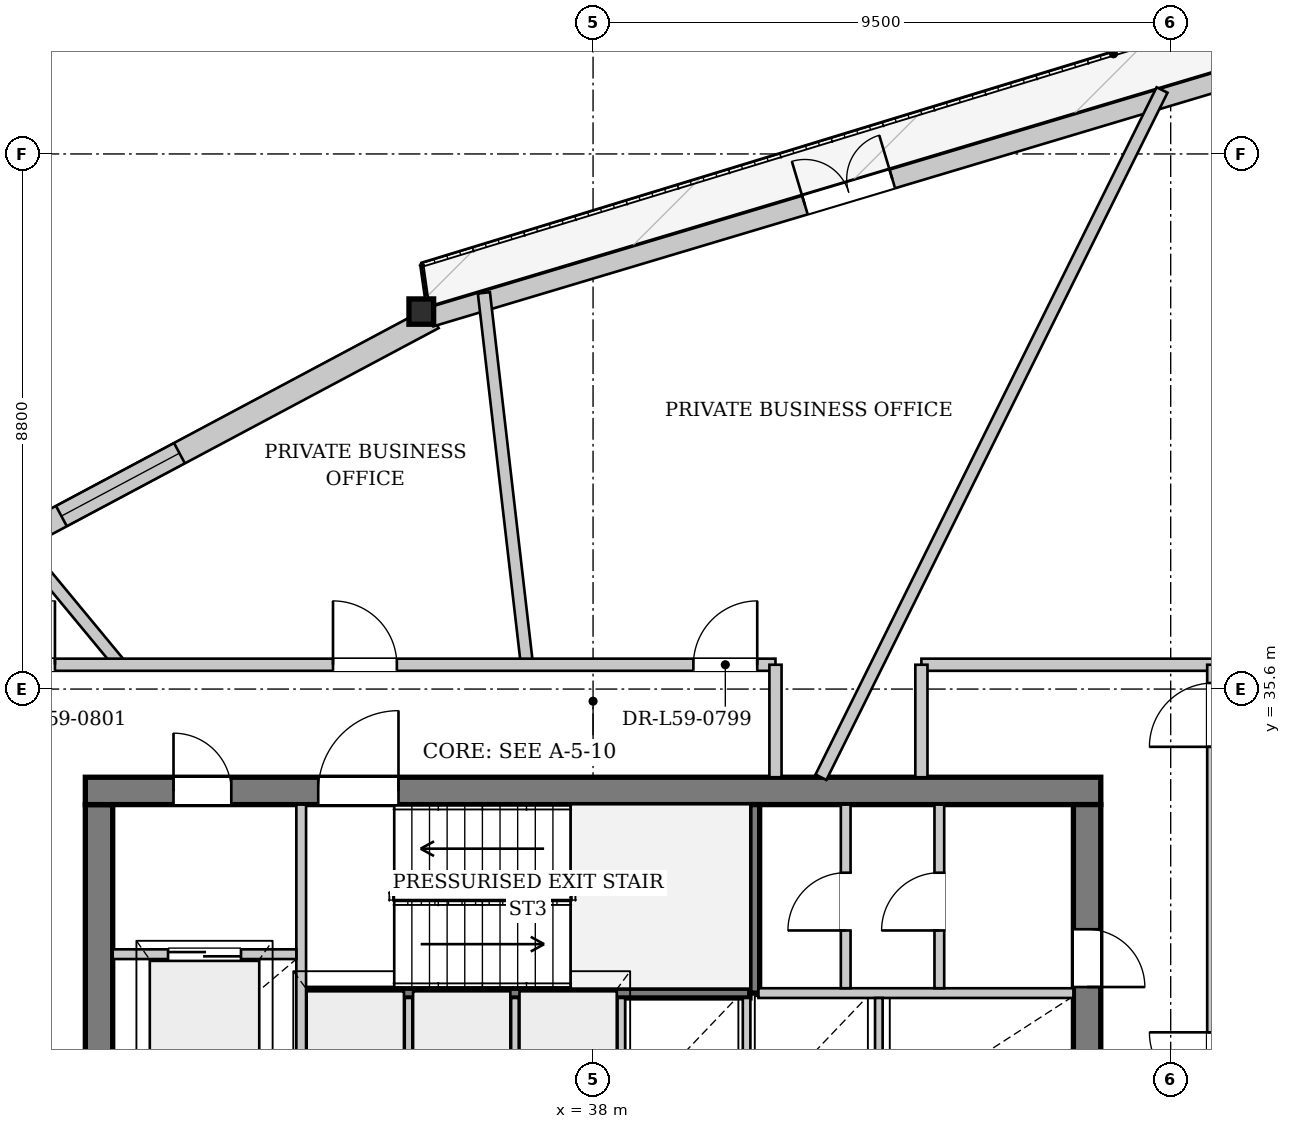
"""IFC4 building model, lengths in metres.
Left out: names, types, materials, properties, quantities, classifications, styles, units other than length and angle.
Written with IfcOpenShell. Run it as: python <this file> out.ifc"""

import sys

from ifc_helpers import new_model, si_unit, direction, frame, frame_2d, origin, origin_2d, place, context, subcontext, project, spatial, rectangle, i_section, extrude, source, transform, mapped, element, fill, save


model = new_model("IFC4")
c1 = context("Model", 3, precision=1e-05, world=origin(), true_north=direction((0.0, 1.0)))
c2 = subcontext(c1, "Body", "Model", "MODEL_VIEW")
j1 = project(units=[si_unit("LENGTHUNIT", "METRE"), si_unit("PLANEANGLEUNIT", "RADIAN")], contexts=[c1])
p1 = place(None, origin())
s1 = spatial("IfcSite", under=j1, at=p1, CompositionType="ELEMENT")
p2 = place(p1, origin())
s2 = spatial("IfcBuilding", under=s1, at=p2, CompositionType="ELEMENT")
p3 = place(p2, frame((0.0, 0.0, 223.8)))
s3 = spatial("IfcBuildingStorey", under=s2, at=p3, CompositionType="ELEMENT", Elevation=223.8)
m1 = source(origin(), c2, "Body", "SweptSolid", [
    extrude(i_section(OverallWidth=0.406, OverallDepth=0.416, WebThickness=0.027, FlangeThickness=0.042, at=origin_2d()), origin(), (0.0, 0.0, 1.0), 3.394),
])
p4 = place(p3, frame((35.282, 41.871, 0.0), z_axis=(-0.063010651639, -0.037475513132, 0.99730900111), x_axis=(0.511173344598, -0.859477638902, 0.0)))
e1 = element("IfcColumn", 1, at=p4, inside=s3, PredefinedType="COLUMN", context=c2, shape_type="MappedRepresentation", body=[
    mapped(m1, transform((0.0, 0.0, 0.0), x_axis=(1.0, 0.0, 0.0), y_axis=(0.0, 1.0, 0.0), z_axis=(0.0, 0.0, 1.0), scale=1.0)),
])
p5 = place(p3, frame((15.581, 31.156, 0.0), z_axis=(0.0, 0.0, 1.0), x_axis=(0.882484000586, 0.470342416448, 0.0)))
e2 = element("IfcWall", 2, at=p5, inside=s3, PredefinedType="SOLIDWALL", context=c2, shape_type="SweptSolid", body=[
    extrude(rectangle(XDim=22.425, YDim=0.38, at=frame_2d((11.213, 0.0))), origin(), (0.0, 0.0, 1.0), 2.822),
])
p6 = place(p5, frame((5.179, 0.0, 0.452)))
e3 = element("IfcOpeningElement", 3, at=p6, cuts=e2, PredefinedType="OPENING", context=c2, shape_type="SweptSolid", body=[
    extrude(rectangle(XDim=2.2, YDim=2.25, at=frame_2d((1.1, 1.125))), frame((0.0, 0.2, 0.0), z_axis=(0.0, -1.0, 0.0), x_axis=(1.0, 0.0, 0.0)), (0.0, 0.0, 1.0), 0.4),
])
p7 = place(p5, frame((15.496, 0.0, 0.452)))
e4 = element("IfcOpeningElement", 4, at=p7, cuts=e2, PredefinedType="OPENING", context=c2, shape_type="SweptSolid", body=[
    extrude(rectangle(XDim=2.2, YDim=2.25, at=frame_2d((1.1, 1.125))), frame((0.0, 0.2, 0.0), z_axis=(0.0, -1.0, 0.0), x_axis=(1.0, 0.0, 0.0)), (0.0, 0.0, 1.0), 0.4),
])
p8 = place(p3, frame((35.328, 41.718, 0.0), z_axis=(0.0, 0.0, 1.0), x_axis=(0.958068349803, 0.286539765313, 0.0)))
e5 = element("IfcWall", 5, at=p8, inside=s3, PredefinedType="SOLIDWALL", context=c2, shape_type="SweptSolid", body=[
    extrude(rectangle(XDim=22.426, YDim=0.32, at=frame_2d((11.213, 0.0))), origin(), (0.0, 0.0, 1.0), 2.822),
])
p9 = place(p8, frame((6.426, 0.0, 0.0)))
e6 = element("IfcOpeningElement", 6, at=p9, cuts=e5, PredefinedType="OPENING", context=c2, shape_type="SweptSolid", body=[
    extrude(rectangle(XDim=1.5, YDim=2.3, at=frame_2d((0.75, 1.15))), frame((0.0, 0.17, 0.0), z_axis=(0.0, -1.0, 0.0), x_axis=(1.0, 0.0, 0.0)), (0.0, 0.0, 1.0), 0.34),
])
p10 = place(p8, frame((15.295, 0.0, 0.352)))
e7 = element("IfcOpeningElement", 7, at=p10, cuts=e5, PredefinedType="OPENING", context=c2, shape_type="SweptSolid", body=[
    extrude(rectangle(XDim=2.6, YDim=2.35, at=frame_2d((1.3, 1.175))), frame((0.0, 0.17, 0.0), z_axis=(0.0, -1.0, 0.0), x_axis=(1.0, 0.0, 0.0)), (0.0, 0.0, 1.0), 0.34),
])
p11 = place(p3, frame((29.875, 19.5, 0.0), z_axis=(0.0, 0.0, 1.0), x_axis=(0.0, 1.0, 0.0)))
e8 = element("IfcWall", 8, at=p11, inside=s3, PredefinedType="SHEAR", context=c2, shape_type="SweptSolid", body=[
    extrude(rectangle(XDim=14.2, YDim=0.45, at=frame_2d((7.1, 0.0))), origin(), (0.0, 0.0, 1.0), 3.33),
])
p12 = place(p11, frame((7.42, 0.0, 0.0)))
e9 = element("IfcOpeningElement", 9, at=p12, cuts=e8, PredefinedType="OPENING", context=c2, shape_type="SweptSolid", body=[
    extrude(rectangle(XDim=1.6, YDim=2.2, at=frame_2d((0.8, 1.1))), frame((0.0, 0.235, 0.0), z_axis=(0.0, -1.0, 0.0), x_axis=(1.0, 0.0, 0.0)), (0.0, 0.0, 1.0), 0.47),
])
p13 = place(p3, frame((29.65, 33.925, 0.0), z_axis=(0.0, 0.0, 1.0), x_axis=(1.0, 0.0, 0.0)))
e10 = element("IfcWall", 10, at=p13, inside=s3, PredefinedType="SHEAR", context=c2, shape_type="SweptSolid", body=[
    extrude(rectangle(XDim=16.7, YDim=0.45, at=frame_2d((8.35, 0.0))), origin(), (0.0, 0.0, 1.0), 3.33),
])
p14 = place(p13, frame((1.45, 0.0, 0.0)))
e11 = element("IfcOpeningElement", 11, at=p14, cuts=e10, PredefinedType="OPENING", context=c2, shape_type="SweptSolid", body=[
    extrude(rectangle(XDim=0.95, YDim=2.1, at=frame_2d((0.475, 1.05))), frame((0.0, 0.235, 0.0), z_axis=(0.0, -1.0, 0.0), x_axis=(1.0, 0.0, 0.0)), (0.0, 0.0, 1.0), 0.47),
])
p15 = place(p13, frame((3.83, 0.0, 0.0)))
e12 = element("IfcOpeningElement", 12, at=p15, cuts=e10, PredefinedType="OPENING", context=c2, shape_type="SweptSolid", body=[
    extrude(rectangle(XDim=1.32, YDim=2.2, at=frame_2d((0.66, 1.1))), frame((0.0, 0.235, 0.0), z_axis=(0.0, -1.0, 0.0), x_axis=(1.0, 0.0, 0.0)), (0.0, 0.0, 1.0), 0.47),
])
p16 = place(p3, frame((46.125, 33.7, 0.0), z_axis=(0.0, 0.0, 1.0), x_axis=(0.0, -1.0, 0.0)))
e13 = element("IfcWall", 13, at=p16, inside=s3, PredefinedType="SHEAR", context=c2, shape_type="SweptSolid", body=[
    extrude(rectangle(XDim=14.2, YDim=0.45, at=frame_2d((7.1, 0.0))), origin(), (0.0, 0.0, 1.0), 3.33),
])
p17 = place(p16, frame((5.18, 0.0, 0.0)))
e14 = element("IfcOpeningElement", 14, at=p17, cuts=e13, PredefinedType="OPENING", context=c2, shape_type="SweptSolid", body=[
    extrude(rectangle(XDim=1.6, YDim=2.2, at=frame_2d((0.8, 1.1))), frame((0.0, 0.235, 0.0), z_axis=(0.0, -1.0, 0.0), x_axis=(1.0, 0.0, 0.0)), (0.0, 0.0, 1.0), 0.47),
])
p18 = place(p16, frame((2.05, 0.0, 0.0)))
e15 = element("IfcOpeningElement", 15, at=p18, cuts=e13, PredefinedType="OPENING", context=c2, shape_type="SweptSolid", body=[
    extrude(rectangle(XDim=0.95, YDim=2.1, at=frame_2d((0.475, 1.05))), frame((0.0, 0.235, 0.0), z_axis=(0.0, -1.0, 0.0), x_axis=(1.0, 0.0, 0.0)), (0.0, 0.0, 1.0), 0.47),
])
p19 = place(p3, frame((33.28, 30.6, 0.0), z_axis=(0.0, 0.0, 1.0), x_axis=(1.0, 0.0, 0.0)))
e16 = element("IfcWall", 16, at=p19, inside=s3, PredefinedType="PARTITIONING", context=c2, shape_type="SweptSolid", body=[
    extrude(rectangle(XDim=7.3, YDim=0.16, at=frame_2d((3.65, 0.0))), origin(), (0.0, 0.0, 1.0), 3.33),
])
p20 = place(p3, frame((40.66, 30.6, 0.0), z_axis=(0.0, 0.0, 1.0), x_axis=(0.0, 1.0, 0.0)))
e17 = element("IfcWall", 17, at=p20, inside=s3, PredefinedType="PARTITIONING", context=c2, shape_type="SweptSolid", body=[
    extrude(rectangle(XDim=3.1, YDim=0.16, at=frame_2d((1.55, 0.0))), origin(), (0.0, 0.0, 1.0), 3.33),
])
p21 = place(p3, frame((33.2, 28.44, 0.0), z_axis=(0.0, 0.0, 1.0), x_axis=(0.0, 1.0, 0.0)))
e18 = element("IfcWall", 18, at=p21, inside=s3, PredefinedType="PARTITIONING", context=c2, shape_type="SweptSolid", body=[
    extrude(rectangle(XDim=5.26, YDim=0.16, at=frame_2d((2.63, 0.0))), origin(), (0.0, 0.0, 1.0), 3.33),
])
p22 = place(p3, frame((30.1, 31.24, 0.0), z_axis=(0.0, 0.0, 1.0), x_axis=(1.0, 0.0, 0.0)))
e19 = element("IfcWall", 19, at=p22, inside=s3, PredefinedType="PARTITIONING", context=c2, shape_type="SweptSolid", body=[
    extrude(rectangle(XDim=3.02, YDim=0.16, at=frame_2d((1.51, 0.0))), origin(), (0.0, 0.0, 1.0), 3.33),
])
p23 = place(p22, frame((0.91, 0.0, 0.0)))
e20 = element("IfcOpeningElement", 20, at=p23, cuts=e19, PredefinedType="OPENING", context=c2, shape_type="SweptSolid", body=[
    extrude(rectangle(XDim=1.2, YDim=2.2, at=frame_2d((0.6, 1.1))), frame((0.0, 0.09, 0.0), z_axis=(0.0, -1.0, 0.0), x_axis=(1.0, 0.0, 0.0)), (0.0, 0.0, 1.0), 0.18),
])
p24 = place(p3, frame((40.72, 30.6, 0.0), z_axis=(0.0, 0.0, 1.0), x_axis=(1.0, 0.0, 0.0)))
e21 = element("IfcWall", 21, at=p24, inside=s3, PredefinedType="PARTITIONING", context=c2, shape_type="SweptSolid", body=[
    extrude(rectangle(XDim=5.18, YDim=0.16, at=frame_2d((2.59, 0.0))), origin(), (0.0, 0.0, 1.0), 3.33),
])
for number, where, z_axis, x_axis in (
    (22, (34.965, 28.6, 0.0), (0.0, 0.0, 1.0), (0.0, 1.0, 0.0)),
    (23, (36.715, 28.6, 0.0), (0.0, 0.0, 1.0), (0.0, 1.0, 0.0)),
    (24, (38.465, 28.6, 0.0), (0.0, 0.0, 1.0), (0.0, 1.0, 0.0)),
    (25, (40.525, 28.6, 0.0), (0.0, 0.0, 1.0), (0.0, 1.0, 0.0)),
    (26, (42.7, 28.6, 0.0), (0.0, 0.0, 1.0), (0.0, 1.0, 0.0)),
):
    element("IfcWall", number, at=place(p3, frame(where, z_axis=z_axis, x_axis=x_axis)), inside=s3, PredefinedType="PARTITIONING", context=c2, shape_type="SweptSolid", body=[
        extrude(rectangle(XDim=1.92, YDim=0.125, at=frame_2d((0.96, 0.0))), origin(), (0.0, 0.0, 1.0), 3.33),
    ])
p25 = place(p3, frame((42.155, 30.68, 0.0), z_axis=(0.0, 0.0, 1.0), x_axis=(0.0, 1.0, 0.0)))
e27 = element("IfcWall", 27, at=p25, inside=s3, PredefinedType="PARTITIONING", context=c2, shape_type="SweptSolid", body=[
    extrude(rectangle(XDim=3.02, YDim=0.16, at=frame_2d((1.51, 0.0))), origin(), (0.0, 0.0, 1.0), 3.33),
])
p26 = place(p25, frame((0.95, 0.0, 0.0)))
e28 = element("IfcOpeningElement", 28, at=p26, cuts=e27, PredefinedType="OPENING", context=c2, shape_type="SweptSolid", body=[
    extrude(rectangle(XDim=0.95, YDim=2.1, at=frame_2d((0.475, 1.05))), frame((0.0, 0.09, 0.0), z_axis=(0.0, -1.0, 0.0), x_axis=(1.0, 0.0, 0.0)), (0.0, 0.0, 1.0), 0.18),
])
p27 = place(p3, frame((43.695, 30.68, 0.0), z_axis=(0.0, 0.0, 1.0), x_axis=(0.0, 1.0, 0.0)))
e29 = element("IfcWall", 29, at=p27, inside=s3, PredefinedType="PARTITIONING", context=c2, shape_type="SweptSolid", body=[
    extrude(rectangle(XDim=3.02, YDim=0.16, at=frame_2d((1.51, 0.0))), origin(), (0.0, 0.0, 1.0), 3.33),
])
p28 = place(p27, frame((0.95, 0.0, 0.0)))
e30 = element("IfcOpeningElement", 30, at=p28, cuts=e29, PredefinedType="OPENING", context=c2, shape_type="SweptSolid", body=[
    extrude(rectangle(XDim=0.95, YDim=2.1, at=frame_2d((0.475, 1.05))), frame((0.0, 0.09, 0.0), z_axis=(0.0, -1.0, 0.0), x_axis=(1.0, 0.0, 0.0)), (0.0, 0.0, 1.0), 0.18),
])
p29 = place(p3, frame((48.2, 32.632, 0.0), z_axis=(0.0, 0.0, 1.0), x_axis=(0.860740290166, 0.509044352571, 0.0)))
e31 = element("IfcWall", 31, at=p29, inside=s3, PredefinedType="PARTITIONING", context=c2, shape_type="SweptSolid", body=[
    extrude(rectangle(XDim=9.555, YDim=0.2, at=frame_2d((4.777, 0.0))), origin(), (0.0, 0.0, 1.0), 3.33),
])
p30 = place(p3, frame((41.748, 34.15, 0.0), z_axis=(0.0, 0.0, 1.0), x_axis=(0.44463448422, 0.895712105222, 0.0)))
e32 = element("IfcWall", 32, at=p30, inside=s3, PredefinedType="PARTITIONING", context=c2, shape_type="SweptSolid", body=[
    extrude(rectangle(XDim=12.618, YDim=0.2, at=frame_2d((6.309, 0.0))), origin(), (0.0, 0.0, 1.0), 3.33),
])
p31 = place(p3, frame((36.912, 36.0, 0.0), z_axis=(0.0, 0.0, 1.0), x_axis=(-0.114952203338, 0.993371023811, 0.0)))
e33 = element("IfcWall", 33, at=p31, inside=s3, PredefinedType="PARTITIONING", context=c2, shape_type="SweptSolid", body=[
    extrude(rectangle(XDim=6.157, YDim=0.2, at=frame_2d((3.079, 0.0))), origin(), (0.0, 0.0, 1.0), 3.33),
])
p32 = place(p3, frame((30.224, 36.0, 0.0), z_axis=(0.0, 0.0, 1.0), x_axis=(-0.637396404574, 0.770536062386, 0.0)))
e34 = element("IfcWall", 34, at=p32, inside=s3, PredefinedType="PARTITIONING", context=c2, shape_type="SweptSolid", body=[
    extrude(rectangle(XDim=2.829, YDim=0.2, at=frame_2d((1.415, 0.0))), origin(), (0.0, 0.0, 1.0), 3.33),
])
p33 = place(p3, frame((27.8, 36.0, 0.0), z_axis=(0.0, 0.0, 1.0), x_axis=(1.0, 0.0, 0.0)))
e35 = element("IfcWall", 35, at=p33, inside=s3, PredefinedType="PARTITIONING", context=c2, shape_type="SweptSolid", body=[
    extrude(rectangle(XDim=13.2, YDim=0.2, at=frame_2d((6.6, 0.0))), origin(), (0.0, 0.0, 1.0), 3.33),
])
p34 = place(p33, frame((11.85, 0.0, 0.0)))
e36 = element("IfcOpeningElement", 36, at=p34, cuts=e35, PredefinedType="OPENING", context=c2, shape_type="SweptSolid", body=[
    extrude(rectangle(XDim=1.05, YDim=2.2, at=frame_2d((0.525, 1.1))), frame((0.0, 0.11, 0.0), z_axis=(0.0, -1.0, 0.0), x_axis=(1.0, 0.0, 0.0)), (0.0, 0.0, 1.0), 0.22),
])
p35 = place(p33, frame((5.923, 0.0, 0.0)))
e37 = element("IfcOpeningElement", 37, at=p35, cuts=e35, PredefinedType="OPENING", context=c2, shape_type="SweptSolid", body=[
    extrude(rectangle(XDim=1.05, YDim=2.2, at=frame_2d((0.525, 1.1))), frame((0.0, 0.11, 0.0), z_axis=(0.0, -1.0, 0.0), x_axis=(1.0, 0.0, 0.0)), (0.0, 0.0, 1.0), 0.22),
])
p36 = place(p33, frame((0.3, 0.0, 0.0)))
e38 = element("IfcOpeningElement", 38, at=p36, cuts=e35, PredefinedType="OPENING", context=c2, shape_type="SweptSolid", body=[
    extrude(rectangle(XDim=1.05, YDim=2.2, at=frame_2d((0.525, 1.1))), frame((0.0, 0.11, 0.0), z_axis=(0.0, -1.0, 0.0), x_axis=(1.0, 0.0, 0.0)), (0.0, 0.0, 1.0), 0.22),
])
p37 = place(p3, frame((41.0, 34.15, 0.0), z_axis=(0.0, 0.0, 1.0), x_axis=(0.0, 1.0, 0.0)))
e39 = element("IfcWall", 39, at=p37, inside=s3, PredefinedType="PARTITIONING", context=c2, shape_type="SweptSolid", body=[
    extrude(rectangle(XDim=1.85, YDim=0.2, at=frame_2d((0.925, 0.0))), origin(), (0.0, 0.0, 1.0), 3.33),
])
p38 = place(p3, frame((43.4, 36.0, 0.0), z_axis=(0.0, 0.0, 1.0), x_axis=(1.0, 0.0, 0.0)))
e40 = element("IfcWall", 40, at=p38, inside=s3, PredefinedType="PARTITIONING", context=c2, shape_type="SweptSolid", body=[
    extrude(rectangle(XDim=4.8, YDim=0.2, at=frame_2d((2.4, 0.0))), origin(), (0.0, 0.0, 1.0), 3.33),
])
p39 = place(p3, frame((43.4, 34.15, 0.0), z_axis=(0.0, 0.0, 1.0), x_axis=(0.0, 1.0, 0.0)))
e41 = element("IfcWall", 41, at=p39, inside=s3, PredefinedType="PARTITIONING", context=c2, shape_type="SweptSolid", body=[
    extrude(rectangle(XDim=1.85, YDim=0.2, at=frame_2d((0.925, 0.0))), origin(), (0.0, 0.0, 1.0), 3.33),
])
p40 = place(p3, frame((48.2, 17.2, 0.0), z_axis=(0.0, 0.0, 1.0), x_axis=(0.0, 1.0, 0.0)))
e42 = element("IfcWall", 42, at=p40, inside=s3, PredefinedType="PARTITIONING", context=c2, shape_type="SweptSolid", body=[
    extrude(rectangle(XDim=18.8, YDim=0.2, at=frame_2d((9.4, 0.0))), origin(), (0.0, 0.0, 1.0), 3.015),
])
p41 = place(p40, frame((11.705, 0.0, 0.0)))
e43 = element("IfcOpeningElement", 43, at=p41, cuts=e42, PredefinedType="OPENING", context=c2, shape_type="SweptSolid", body=[
    extrude(rectangle(XDim=1.05, YDim=2.2, at=frame_2d((0.525, 1.1))), frame((0.0, 0.11, 0.0), z_axis=(0.0, -1.0, 0.0), x_axis=(1.0, 0.0, 0.0)), (0.0, 0.0, 1.0), 0.22),
])
p42 = place(p40, frame((17.45, 0.0, 0.0)))
e44 = element("IfcOpeningElement", 44, at=p42, cuts=e42, PredefinedType="OPENING", context=c2, shape_type="SweptSolid", body=[
    extrude(rectangle(XDim=1.05, YDim=2.2, at=frame_2d((0.525, 1.1))), frame((0.0, 0.11, 0.0), z_axis=(0.0, -1.0, 0.0), x_axis=(1.0, 0.0, 0.0)), (0.0, 0.0, 1.0), 0.22),
])
p43 = place(p40, frame((0.3, 0.0, 0.0)))
e45 = element("IfcOpeningElement", 45, at=p43, cuts=e42, PredefinedType="OPENING", context=c2, shape_type="SweptSolid", body=[
    extrude(rectangle(XDim=1.05, YDim=2.2, at=frame_2d((0.525, 1.1))), frame((0.0, 0.11, 0.0), z_axis=(0.0, -1.0, 0.0), x_axis=(1.0, 0.0, 0.0)), (0.0, 0.0, 1.0), 0.22),
])
p44 = place(p40, frame((4.377, 0.0, 0.0)))
e46 = element("IfcOpeningElement", 46, at=p44, cuts=e42, PredefinedType="OPENING", context=c2, shape_type="SweptSolid", body=[
    extrude(rectangle(XDim=0.9, YDim=2.1, at=frame_2d((0.45, 1.05))), frame((0.0, 0.11, 0.0), z_axis=(0.0, -1.0, 0.0), x_axis=(1.0, 0.0, 0.0)), (0.0, 0.0, 1.0), 0.22),
])
m2 = source(origin(), c2, "Body", "SweptSolid", [
    extrude(rectangle(XDim=2.2, YDim=2.25, at=frame_2d((1.1, 1.125))), frame((0.0, 0.03, 0.0), z_axis=(0.0, -1.0, 0.0), x_axis=(1.0, 0.0, 0.0)), (0.0, 0.0, 1.0), 0.06),
])
p45 = place(p7, origin())
e47 = element("IfcWindow", 47, at=p45, inside=s3, PartitioningType="SINGLE_PANEL", PredefinedType="WINDOW", context=c2, shape_type="MappedRepresentation", body=[
    mapped(m2, transform((0.0, 0.0, 0.0), x_axis=(1.0, 0.0, 0.0), y_axis=(0.0, 1.0, 0.0), z_axis=(0.0, 0.0, 1.0), scale=1.0)),
])
fill(e4, e47)
m3 = source(origin(), c2, "Body", "SweptSolid", [
    extrude(rectangle(XDim=1.5, YDim=2.3, at=frame_2d((0.75, 1.15))), frame((0.0, 0.025, 0.0), z_axis=(0.0, -1.0, 0.0), x_axis=(1.0, 0.0, 0.0)), (0.0, 0.0, 1.0), 0.05),
])
p46 = place(p9, origin())
e48 = element("IfcDoor", 48, at=p46, inside=s3, OperationType="DOUBLE_DOOR_SINGLE_SWING", PredefinedType="DOOR", context=c2, shape_type="MappedRepresentation", body=[
    mapped(m3, transform((0.0, 0.0, 0.0), x_axis=(1.0, 0.0, 0.0), y_axis=(0.0, 1.0, 0.0), z_axis=(0.0, 0.0, 1.0), scale=1.0)),
])
fill(e6, e48)
m4 = source(origin(), c2, "Body", "SweptSolid", [
    extrude(rectangle(XDim=0.95, YDim=2.1, at=frame_2d((0.475, 1.05))), frame((0.0, 0.025, 0.0), z_axis=(0.0, -1.0, 0.0), x_axis=(1.0, 0.0, 0.0)), (0.0, 0.0, 1.0), 0.05),
])
p47 = place(p14, origin())
e49 = element("IfcDoor", 49, at=p47, inside=s3, OperationType="SINGLE_SWING_LEFT", PredefinedType="DOOR", context=c2, shape_type="MappedRepresentation", body=[
    mapped(m4, transform((0.0, 0.0, 0.0), x_axis=(1.0, 0.0, 0.0), y_axis=(0.0, 1.0, 0.0), z_axis=(0.0, 0.0, 1.0), scale=1.0)),
])
fill(e11, e49)
m5 = source(origin(), c2, "Body", "SweptSolid", [
    extrude(rectangle(XDim=1.32, YDim=2.2, at=frame_2d((0.66, 1.1))), frame((0.0, 0.025, 0.0), z_axis=(0.0, -1.0, 0.0), x_axis=(1.0, 0.0, 0.0)), (0.0, 0.0, 1.0), 0.05),
])
p48 = place(p15, origin())
e50 = element("IfcDoor", 50, at=p48, inside=s3, OperationType="SINGLE_SWING_RIGHT", PredefinedType="DOOR", context=c2, shape_type="MappedRepresentation", body=[
    mapped(m5, transform((0.0, 0.0, 0.0), x_axis=(1.0, 0.0, 0.0), y_axis=(0.0, 1.0, 0.0), z_axis=(0.0, 0.0, 1.0), scale=1.0)),
])
fill(e12, e50)
m6 = source(origin(), c2, "Body", "SweptSolid", [
    extrude(rectangle(XDim=1.2, YDim=2.2, at=frame_2d((0.6, 1.1))), frame((0.0, 0.025, 0.0), z_axis=(0.0, -1.0, 0.0), x_axis=(1.0, 0.0, 0.0)), (0.0, 0.0, 1.0), 0.05),
])
p49 = place(p23, origin())
e51 = element("IfcDoor", 51, at=p49, inside=s3, OperationType="DOUBLE_DOOR_SLIDING", PredefinedType="DOOR", context=c2, shape_type="MappedRepresentation", body=[
    mapped(m6, transform((0.0, 0.0, 0.0), x_axis=(1.0, 0.0, 0.0), y_axis=(0.0, 1.0, 0.0), z_axis=(0.0, 0.0, 1.0), scale=1.0)),
])
fill(e20, e51)
p50 = place(p26, origin())
e52 = element("IfcDoor", 52, at=p50, inside=s3, OperationType="SINGLE_SWING_LEFT", PredefinedType="DOOR", context=c2, shape_type="MappedRepresentation", body=[
    mapped(m4, transform((0.0, 0.0, 0.0), x_axis=(1.0, 0.0, 0.0), y_axis=(0.0, 1.0, 0.0), z_axis=(0.0, 0.0, 1.0), scale=1.0)),
])
fill(e28, e52)
p51 = place(p28, origin())
e53 = element("IfcDoor", 53, at=p51, inside=s3, OperationType="SINGLE_SWING_LEFT", PredefinedType="DOOR", context=c2, shape_type="MappedRepresentation", body=[
    mapped(m4, transform((0.0, 0.0, 0.0), x_axis=(1.0, 0.0, 0.0), y_axis=(0.0, 1.0, 0.0), z_axis=(0.0, 0.0, 1.0), scale=1.0)),
])
fill(e30, e53)
p52 = place(p18, origin())
e54 = element("IfcDoor", 54, at=p52, inside=s3, OperationType="SINGLE_SWING_RIGHT", PredefinedType="DOOR", context=c2, shape_type="MappedRepresentation", body=[
    mapped(m4, transform((0.0, 0.0, 0.0), x_axis=(1.0, 0.0, 0.0), y_axis=(0.0, 1.0, 0.0), z_axis=(0.0, 0.0, 1.0), scale=1.0)),
])
fill(e15, e54)
m7 = source(origin(), c2, "Body", "SweptSolid", [
    extrude(rectangle(XDim=1.05, YDim=2.2, at=frame_2d((0.525, 1.1))), frame((0.0, 0.025, 0.0), z_axis=(0.0, -1.0, 0.0), x_axis=(1.0, 0.0, 0.0)), (0.0, 0.0, 1.0), 0.05),
])
p53 = place(p34, origin())
e55 = element("IfcDoor", 55, at=p53, inside=s3, OperationType="SINGLE_SWING_RIGHT", PredefinedType="DOOR", context=c2, shape_type="MappedRepresentation", body=[
    mapped(m7, transform((0.0, 0.0, 0.0), x_axis=(1.0, 0.0, 0.0), y_axis=(0.0, 1.0, 0.0), z_axis=(0.0, 0.0, 1.0), scale=1.0)),
])
fill(e36, e55)
p54 = place(p35, origin())
e56 = element("IfcDoor", 56, at=p54, inside=s3, OperationType="SINGLE_SWING_LEFT", PredefinedType="DOOR", context=c2, shape_type="MappedRepresentation", body=[
    mapped(m7, transform((0.0, 0.0, 0.0), x_axis=(1.0, 0.0, 0.0), y_axis=(0.0, 1.0, 0.0), z_axis=(0.0, 0.0, 1.0), scale=1.0)),
])
fill(e37, e56)
p55 = place(p36, origin())
e57 = element("IfcDoor", 57, at=p55, inside=s3, OperationType="SINGLE_SWING_RIGHT", PredefinedType="DOOR", context=c2, shape_type="MappedRepresentation", body=[
    mapped(m7, transform((0.0, 0.0, 0.0), x_axis=(1.0, 0.0, 0.0), y_axis=(0.0, 1.0, 0.0), z_axis=(0.0, 0.0, 1.0), scale=1.0)),
])
fill(e38, e57)
save(model, sys.argv[1])
